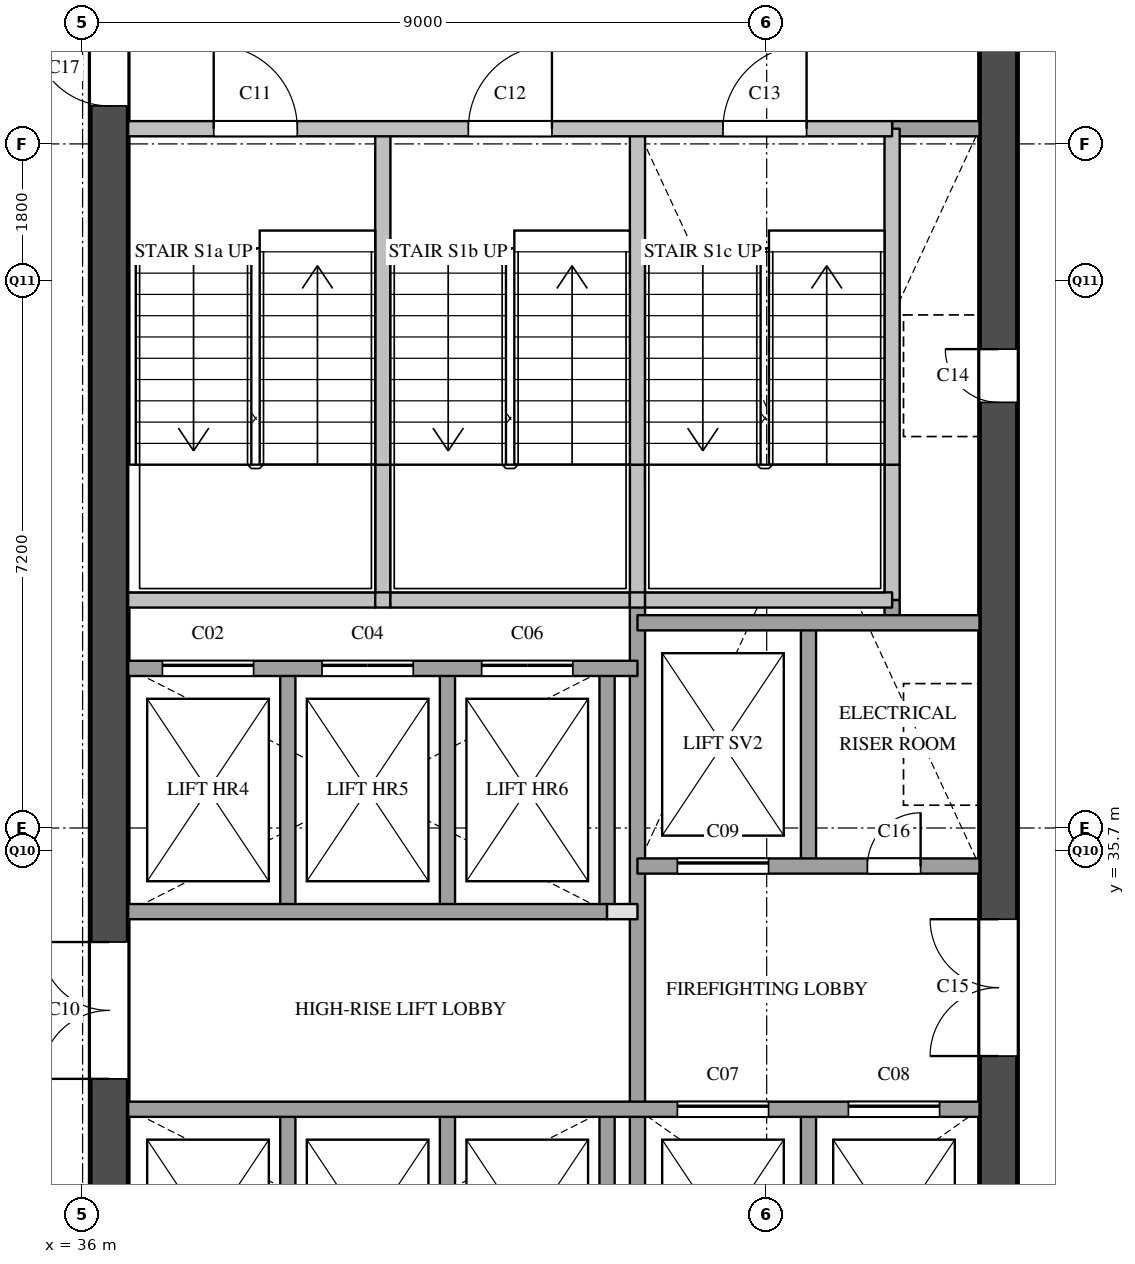
"""IFC4 building model, lengths in metres.
Left out: names, types, materials, properties, quantities, classifications, styles, units other than length and angle.
Written with IfcOpenShell. Run it as: python <this file> out.ifc"""

import sys

from ifc_helpers import new_model, si_unit, direction, frame, frame_2d, origin, place, context, subcontext, project, spatial, rectangle, extrude, element, fill, save


model = new_model("IFC4")
c1 = context("Model", 3, precision=1e-05, world=origin(), true_north=direction((0.0, 1.0)))
c2 = subcontext(c1, "Body", "Model", "MODEL_VIEW")
j1 = project(units=[si_unit("LENGTHUNIT", "METRE"), si_unit("PLANEANGLEUNIT", "RADIAN")], contexts=[c1])
p1 = place(None, origin())
s1 = spatial("IfcSite", under=j1, at=p1, CompositionType="ELEMENT")
p2 = place(p1, origin())
s2 = spatial("IfcBuilding", under=s1, at=p2, CompositionType="ELEMENT")
p3 = place(p2, frame((0.0, 0.0, 166.1)))
s3 = spatial("IfcBuildingStorey", under=s2, at=p3, CompositionType="ELEMENT", Elevation=166.1)
p4 = place(p3, frame((36.35, 29.1, 0.0), z_axis=(0.0, 0.0, 1.0), x_axis=(0.0, 1.0, 0.0)))
e1 = element("IfcWall", 1, at=p4, inside=s3, PredefinedType="SHEAR", context=c2, shape_type="SweptSolid", body=[
    extrude(rectangle(XDim=20.3, YDim=0.5, at=frame_2d((10.15, 0.0))), origin(), (0.0, 0.0, 1.0), 3.6),
])
p5 = place(p4, frame((3.6, 0.0, 0.0)))
e2 = element("IfcOpeningElement", 2, at=p5, cuts=e1, PredefinedType="OPENING", context=c2, shape_type="SweptSolid", body=[
    extrude(rectangle(XDim=1.8, YDim=2.1, at=frame_2d((0.9, 1.05))), frame((0.0, 0.26, 0.0), z_axis=(0.0, -1.0, 0.0), x_axis=(1.0, 0.0, 0.0)), (0.0, 0.0, 1.0), 0.52),
])
p6 = place(p4, frame((16.4, 0.0, 0.0)))
e3 = element("IfcOpeningElement", 3, at=p6, cuts=e1, PredefinedType="OPENING", context=c2, shape_type="SweptSolid", body=[
    extrude(rectangle(XDim=1.0, YDim=2.1, at=frame_2d((0.5, 1.05))), frame((0.0, 0.26, 0.0), z_axis=(0.0, -1.0, 0.0), x_axis=(1.0, 0.0, 0.0)), (0.0, 0.0, 1.0), 0.52),
])
p7 = place(p3, frame((48.05, 29.1, 0.0), z_axis=(0.0, 0.0, 1.0), x_axis=(0.0, 1.0, 0.0)))
e4 = element("IfcWall", 4, at=p7, inside=s3, PredefinedType="SHEAR", context=c2, shape_type="SweptSolid", body=[
    extrude(rectangle(XDim=20.3, YDim=0.5, at=frame_2d((10.15, 0.0))), origin(), (0.0, 0.0, 1.0), 3.6),
])
p8 = place(p7, frame((12.5, 0.0, 0.0)))
e5 = element("IfcOpeningElement", 5, at=p8, cuts=e4, PredefinedType="OPENING", context=c2, shape_type="SweptSolid", body=[
    extrude(rectangle(XDim=0.7, YDim=2.1, at=frame_2d((0.35, 1.05))), frame((0.0, 0.26, 0.0), z_axis=(0.0, -1.0, 0.0), x_axis=(1.0, 0.0, 0.0)), (0.0, 0.0, 1.0), 0.52),
])
p9 = place(p7, frame((3.9, 0.0, 0.0)))
e6 = element("IfcOpeningElement", 6, at=p9, cuts=e4, PredefinedType="OPENING", context=c2, shape_type="SweptSolid", body=[
    extrude(rectangle(XDim=1.8, YDim=2.1, at=frame_2d((0.9, 1.05))), frame((0.0, 0.26, 0.0), z_axis=(0.0, -1.0, 0.0), x_axis=(1.0, 0.0, 0.0)), (0.0, 0.0, 1.0), 0.52),
])
p10 = place(p3, frame((38.7, 29.1, 0.0), z_axis=(0.0, 0.0, 1.0), x_axis=(0.0, 1.0, 0.0)))
e7 = element("IfcWall", 7, at=p10, inside=s3, PredefinedType="SOLIDWALL", context=c2, shape_type="SweptSolid", body=[
    extrude(rectangle(XDim=3.2, YDim=0.2, at=frame_2d((1.6, 0.0))), origin(), (0.0, 0.0, 1.0), 3.6),
])
p11 = place(p3, frame((38.7, 34.9, 0.0), z_axis=(0.0, 0.0, 1.0), x_axis=(0.0, 1.0, 0.0)))
e8 = element("IfcWall", 8, at=p11, inside=s3, PredefinedType="SOLIDWALL", context=c2, shape_type="SweptSolid", body=[
    extrude(rectangle(XDim=3.2, YDim=0.2, at=frame_2d((1.6, 0.0))), origin(), (0.0, 0.0, 1.0), 3.6),
])
p12 = place(p3, frame((39.95, 39.0, 0.0), z_axis=(0.0, 0.0, 1.0), x_axis=(0.0, 1.0, 0.0)))
e9 = element("IfcWall", 9, at=p12, inside=s3, PredefinedType="SOLIDWALL", context=c2, shape_type="SweptSolid", body=[
    extrude(rectangle(XDim=1.78, YDim=0.2, at=frame_2d((0.89, 0.0))), origin(), (0.0, 0.0, 1.0), 3.6),
])
p13 = place(p3, frame((39.95, 40.78, 0.0), z_axis=(0.0, 0.0, 1.0), x_axis=(0.0, 1.0, 0.0)))
e10 = element("IfcWall", 10, at=p13, inside=s3, PredefinedType="SOLIDWALL", context=c2, shape_type="SweptSolid", body=[
    extrude(rectangle(XDim=4.42, YDim=0.2, at=frame_2d((2.21, 0.0))), origin(), (0.0, 0.0, 1.0), 3.6),
])
p14 = place(p3, frame((40.8, 29.1, 0.0), z_axis=(0.0, 0.0, 1.0), x_axis=(0.0, 1.0, 0.0)))
e11 = element("IfcWall", 11, at=p14, inside=s3, PredefinedType="SOLIDWALL", context=c2, shape_type="SweptSolid", body=[
    extrude(rectangle(XDim=3.2, YDim=0.2, at=frame_2d((1.6, 0.0))), origin(), (0.0, 0.0, 1.0), 3.6),
])
p15 = place(p3, frame((40.8, 34.9, 0.0), z_axis=(0.0, 0.0, 1.0), x_axis=(0.0, 1.0, 0.0)))
e12 = element("IfcWall", 12, at=p15, inside=s3, PredefinedType="SOLIDWALL", context=c2, shape_type="SweptSolid", body=[
    extrude(rectangle(XDim=3.2, YDim=0.2, at=frame_2d((1.6, 0.0))), origin(), (0.0, 0.0, 1.0), 3.6),
])
p16 = place(p3, frame((42.9, 29.1, 0.0), z_axis=(0.0, 0.0, 1.0), x_axis=(0.0, 1.0, 0.0)))
e13 = element("IfcWall", 13, at=p16, inside=s3, PredefinedType="SOLIDWALL", context=c2, shape_type="SweptSolid", body=[
    extrude(rectangle(XDim=3.2, YDim=0.2, at=frame_2d((1.6, 0.0))), origin(), (0.0, 0.0, 1.0), 3.6),
])
p17 = place(p3, frame((42.9, 34.9, 0.0), z_axis=(0.0, 0.0, 1.0), x_axis=(0.0, 1.0, 0.0)))
e14 = element("IfcWall", 14, at=p17, inside=s3, PredefinedType="SOLIDWALL", context=c2, shape_type="SweptSolid", body=[
    extrude(rectangle(XDim=3.2, YDim=0.2, at=frame_2d((1.6, 0.0))), origin(), (0.0, 0.0, 1.0), 3.6),
])
p18 = place(p3, frame((43.3, 29.1, 0.0), z_axis=(0.0, 0.0, 1.0), x_axis=(0.0, 1.0, 0.0)))
e15 = element("IfcWall", 15, at=p18, inside=s3, PredefinedType="SOLIDWALL", context=c2, shape_type="SweptSolid", body=[
    extrude(rectangle(XDim=9.9, YDim=0.2, at=frame_2d((4.95, 0.0))), origin(), (0.0, 0.0, 1.0), 3.6),
])
p19 = place(p3, frame((43.3, 39.0, 0.0), z_axis=(0.0, 0.0, 1.0), x_axis=(0.0, 1.0, 0.0)))
e16 = element("IfcWall", 16, at=p19, inside=s3, PredefinedType="SOLIDWALL", context=c2, shape_type="SweptSolid", body=[
    extrude(rectangle(XDim=1.78, YDim=0.2, at=frame_2d((0.89, 0.0))), origin(), (0.0, 0.0, 1.0), 3.6),
])
p20 = place(p3, frame((43.3, 40.78, 0.0), z_axis=(0.0, 0.0, 1.0), x_axis=(0.0, 1.0, 0.0)))
e17 = element("IfcWall", 17, at=p20, inside=s3, PredefinedType="SOLIDWALL", context=c2, shape_type="SweptSolid", body=[
    extrude(rectangle(XDim=4.42, YDim=0.2, at=frame_2d((2.21, 0.0))), origin(), (0.0, 0.0, 1.0), 3.6),
])
for number, where, z_axis, x_axis in (
    (18, (45.55, 29.1, 0.0), (0.0, 0.0, 1.0), (0.0, 1.0, 0.0)),
    (19, (45.55, 35.5, 0.0), (0.0, 0.0, 1.0), (0.0, 1.0, 0.0)),
):
    element("IfcWall", number, at=place(p3, frame(where, z_axis=z_axis, x_axis=x_axis)), inside=s3, PredefinedType="SOLIDWALL", context=c2, shape_type="SweptSolid", body=[
        extrude(rectangle(XDim=3.2, YDim=0.2, at=frame_2d((1.6, 0.0))), origin(), (0.0, 0.0, 1.0), 3.6),
    ])
p21 = place(p3, frame((46.65, 38.7, 0.0), z_axis=(0.0, 0.0, 1.0), x_axis=(0.0, 1.0, 0.0)))
e20 = element("IfcWall", 20, at=p21, inside=s3, PredefinedType="SOLIDWALL", context=c2, shape_type="SweptSolid", body=[
    extrude(rectangle(XDim=0.3, YDim=0.2, at=frame_2d((0.15, 0.0))), origin(), (0.0, 0.0, 1.0), 3.6),
])
p22 = place(p3, frame((46.65, 39.0, 0.0), z_axis=(0.0, 0.0, 1.0), x_axis=(0.0, 1.0, 0.0)))
e21 = element("IfcWall", 21, at=p22, inside=s3, PredefinedType="SOLIDWALL", context=c2, shape_type="SweptSolid", body=[
    extrude(rectangle(XDim=1.78, YDim=0.2, at=frame_2d((0.89, 0.0))), origin(), (0.0, 0.0, 1.0), 3.6),
])
p23 = place(p3, frame((46.65, 40.78, 0.0), z_axis=(0.0, 0.0, 1.0), x_axis=(0.0, 1.0, 0.0)))
e22 = element("IfcWall", 22, at=p23, inside=s3, PredefinedType="SOLIDWALL", context=c2, shape_type="SweptSolid", body=[
    extrude(rectangle(XDim=4.42, YDim=0.2, at=frame_2d((2.21, 0.0))), origin(), (0.0, 0.0, 1.0), 3.6),
])
p24 = place(p3, frame((36.6, 32.3, 0.0), z_axis=(0.0, 0.0, 1.0), x_axis=(1.0, 0.0, 0.0)))
e23 = element("IfcWall", 23, at=p24, inside=s3, PredefinedType="SOLIDWALL", context=c2, shape_type="SweptSolid", body=[
    extrude(rectangle(XDim=11.2, YDim=0.2, at=frame_2d((5.6, 0.0))), origin(), (0.0, 0.0, 1.0), 3.6),
])
p25 = place(p24, frame((7.225, 0.0, 0.0)))
e24 = element("IfcOpeningElement", 24, at=p25, cuts=e23, PredefinedType="OPENING", context=c2, shape_type="SweptSolid", body=[
    extrude(rectangle(XDim=1.2, YDim=2.1, at=frame_2d((0.6, 1.05))), frame((0.0, 0.11, 0.0), z_axis=(0.0, -1.0, 0.0), x_axis=(1.0, 0.0, 0.0)), (0.0, 0.0, 1.0), 0.22),
])
p26 = place(p24, frame((9.475, 0.0, 0.0)))
e25 = element("IfcOpeningElement", 25, at=p26, cuts=e23, PredefinedType="OPENING", context=c2, shape_type="SweptSolid", body=[
    extrude(rectangle(XDim=1.2, YDim=2.1, at=frame_2d((0.6, 1.05))), frame((0.0, 0.11, 0.0), z_axis=(0.0, -1.0, 0.0), x_axis=(1.0, 0.0, 0.0)), (0.0, 0.0, 1.0), 0.22),
])
p27 = place(p3, frame((42.9, 34.9, 0.0), z_axis=(0.0, 0.0, 1.0), x_axis=(1.0, 0.0, 0.0)))
e26 = element("IfcWall", 26, at=p27, inside=s3, PredefinedType="PARTITIONING", context=c2, shape_type="SweptSolid", body=[
    extrude(rectangle(XDim=0.4, YDim=0.2, at=frame_2d((0.2, 0.0))), origin(), (0.0, 0.0, 1.0), 3.6),
])
p28 = place(p3, frame((36.6, 34.9, 0.0), z_axis=(0.0, 0.0, 1.0), x_axis=(1.0, 0.0, 0.0)))
e27 = element("IfcWall", 27, at=p28, inside=s3, PredefinedType="SOLIDWALL", context=c2, shape_type="SweptSolid", body=[
    extrude(rectangle(XDim=6.3, YDim=0.2, at=frame_2d((3.15, 0.0))), origin(), (0.0, 0.0, 1.0), 3.6),
])
p29 = place(p3, frame((43.3, 35.5, 0.0), z_axis=(0.0, 0.0, 1.0), x_axis=(1.0, 0.0, 0.0)))
e28 = element("IfcWall", 28, at=p29, inside=s3, PredefinedType="SOLIDWALL", context=c2, shape_type="SweptSolid", body=[
    extrude(rectangle(XDim=4.5, YDim=0.2, at=frame_2d((2.25, 0.0))), origin(), (0.0, 0.0, 1.0), 3.6),
])
p30 = place(p29, frame((0.525, 0.0, 0.0)))
e29 = element("IfcOpeningElement", 29, at=p30, cuts=e28, PredefinedType="OPENING", context=c2, shape_type="SweptSolid", body=[
    extrude(rectangle(XDim=1.2, YDim=2.1, at=frame_2d((0.6, 1.05))), frame((0.0, 0.11, 0.0), z_axis=(0.0, -1.0, 0.0), x_axis=(1.0, 0.0, 0.0)), (0.0, 0.0, 1.0), 0.22),
])
p31 = place(p29, frame((3.025, 0.0, 0.0)))
e30 = element("IfcOpeningElement", 30, at=p31, cuts=e28, PredefinedType="OPENING", context=c2, shape_type="SweptSolid", body=[
    extrude(rectangle(XDim=0.7, YDim=2.1, at=frame_2d((0.35, 1.05))), frame((0.0, 0.11, 0.0), z_axis=(0.0, -1.0, 0.0), x_axis=(1.0, 0.0, 0.0)), (0.0, 0.0, 1.0), 0.22),
])
p32 = place(p3, frame((36.6, 38.1, 0.0), z_axis=(0.0, 0.0, 1.0), x_axis=(1.0, 0.0, 0.0)))
e31 = element("IfcWall", 31, at=p32, inside=s3, PredefinedType="SOLIDWALL", context=c2, shape_type="SweptSolid", body=[
    extrude(rectangle(XDim=6.7, YDim=0.2, at=frame_2d((3.35, 0.0))), origin(), (0.0, 0.0, 1.0), 3.6),
])
p33 = place(p32, frame((0.45, 0.0, 0.0)))
e32 = element("IfcOpeningElement", 32, at=p33, cuts=e31, PredefinedType="OPENING", context=c2, shape_type="SweptSolid", body=[
    extrude(rectangle(XDim=1.2, YDim=2.1, at=frame_2d((0.6, 1.05))), frame((0.0, 0.11, 0.0), z_axis=(0.0, -1.0, 0.0), x_axis=(1.0, 0.0, 0.0)), (0.0, 0.0, 1.0), 0.22),
])
p34 = place(p32, frame((2.55, 0.0, 0.0)))
e33 = element("IfcOpeningElement", 33, at=p34, cuts=e31, PredefinedType="OPENING", context=c2, shape_type="SweptSolid", body=[
    extrude(rectangle(XDim=1.2, YDim=2.1, at=frame_2d((0.6, 1.05))), frame((0.0, 0.11, 0.0), z_axis=(0.0, -1.0, 0.0), x_axis=(1.0, 0.0, 0.0)), (0.0, 0.0, 1.0), 0.22),
])
p35 = place(p32, frame((4.65, 0.0, 0.0)))
e34 = element("IfcOpeningElement", 34, at=p35, cuts=e31, PredefinedType="OPENING", context=c2, shape_type="SweptSolid", body=[
    extrude(rectangle(XDim=1.2, YDim=2.1, at=frame_2d((0.6, 1.05))), frame((0.0, 0.11, 0.0), z_axis=(0.0, -1.0, 0.0), x_axis=(1.0, 0.0, 0.0)), (0.0, 0.0, 1.0), 0.22),
])
p36 = place(p3, frame((43.3, 38.7, 0.0), z_axis=(0.0, 0.0, 1.0), x_axis=(1.0, 0.0, 0.0)))
e35 = element("IfcWall", 35, at=p36, inside=s3, PredefinedType="SOLIDWALL", context=c2, shape_type="SweptSolid", body=[
    extrude(rectangle(XDim=4.5, YDim=0.2, at=frame_2d((2.25, 0.0))), origin(), (0.0, 0.0, 1.0), 3.6),
])
p37 = place(p3, frame((36.6, 39.0, 0.0), z_axis=(0.0, 0.0, 1.0), x_axis=(1.0, 0.0, 0.0)))
e36 = element("IfcWall", 36, at=p37, inside=s3, PredefinedType="SOLIDWALL", context=c2, shape_type="SweptSolid", body=[
    extrude(rectangle(XDim=3.25, YDim=0.2, at=frame_2d((1.625, 0.0))), origin(), (0.0, 0.0, 1.0), 3.6),
])
p38 = place(p3, frame((39.85, 39.0, 0.0), z_axis=(0.0, 0.0, 1.0), x_axis=(1.0, 0.0, 0.0)))
e37 = element("IfcWall", 37, at=p38, inside=s3, PredefinedType="SOLIDWALL", context=c2, shape_type="SweptSolid", body=[
    extrude(rectangle(XDim=0.2, YDim=0.2, at=frame_2d((0.1, 0.0))), origin(), (0.0, 0.0, 1.0), 3.6),
])
p39 = place(p3, frame((40.05, 39.0, 0.0), z_axis=(0.0, 0.0, 1.0), x_axis=(1.0, 0.0, 0.0)))
e38 = element("IfcWall", 38, at=p39, inside=s3, PredefinedType="SOLIDWALL", context=c2, shape_type="SweptSolid", body=[
    extrude(rectangle(XDim=3.15, YDim=0.2, at=frame_2d((1.575, 0.0))), origin(), (0.0, 0.0, 1.0), 3.6),
])
p40 = place(p3, frame((43.2, 39.0, 0.0), z_axis=(0.0, 0.0, 1.0), x_axis=(1.0, 0.0, 0.0)))
e39 = element("IfcWall", 39, at=p40, inside=s3, PredefinedType="SOLIDWALL", context=c2, shape_type="SweptSolid", body=[
    extrude(rectangle(XDim=0.2, YDim=0.2, at=frame_2d((0.1, 0.0))), origin(), (0.0, 0.0, 1.0), 3.6),
])
p41 = place(p3, frame((43.4, 39.0, 0.0), z_axis=(0.0, 0.0, 1.0), x_axis=(1.0, 0.0, 0.0)))
e40 = element("IfcWall", 40, at=p41, inside=s3, PredefinedType="SOLIDWALL", context=c2, shape_type="SweptSolid", body=[
    extrude(rectangle(XDim=3.25, YDim=0.2, at=frame_2d((1.625, 0.0))), origin(), (0.0, 0.0, 1.0), 3.6),
])
p42 = place(p3, frame((46.65, 45.2, 0.0), z_axis=(0.0, 0.0, 1.0), x_axis=(1.0, 0.0, 0.0)))
e41 = element("IfcWall", 41, at=p42, inside=s3, PredefinedType="SOLIDWALL", context=c2, shape_type="SweptSolid", body=[
    extrude(rectangle(XDim=1.15, YDim=0.2, at=frame_2d((0.575, 0.0))), origin(), (0.0, 0.0, 1.0), 3.6),
])
p43 = place(p3, frame((36.6, 45.2, 0.0), z_axis=(0.0, 0.0, 1.0), x_axis=(1.0, 0.0, 0.0)))
e42 = element("IfcWall", 42, at=p43, inside=s3, PredefinedType="SOLIDWALL", context=c2, shape_type="SweptSolid", body=[
    extrude(rectangle(XDim=10.05, YDim=0.2, at=frame_2d((5.025, 0.0))), origin(), (0.0, 0.0, 1.0), 3.6),
])
p44 = place(p43, frame((1.125, 0.0, 0.0)))
e43 = element("IfcOpeningElement", 43, at=p44, cuts=e42, PredefinedType="OPENING", context=c2, shape_type="SweptSolid", body=[
    extrude(rectangle(XDim=1.1, YDim=2.1, at=frame_2d((0.55, 1.05))), frame((0.0, 0.11, 0.0), z_axis=(0.0, -1.0, 0.0), x_axis=(1.0, 0.0, 0.0)), (0.0, 0.0, 1.0), 0.22),
])
p45 = place(p43, frame((4.475, 0.0, 0.0)))
e44 = element("IfcOpeningElement", 44, at=p45, cuts=e42, PredefinedType="OPENING", context=c2, shape_type="SweptSolid", body=[
    extrude(rectangle(XDim=1.1, YDim=2.1, at=frame_2d((0.55, 1.05))), frame((0.0, 0.11, 0.0), z_axis=(0.0, -1.0, 0.0), x_axis=(1.0, 0.0, 0.0)), (0.0, 0.0, 1.0), 0.22),
])
p46 = place(p43, frame((7.825, 0.0, 0.0)))
e45 = element("IfcOpeningElement", 45, at=p46, cuts=e42, PredefinedType="OPENING", context=c2, shape_type="SweptSolid", body=[
    extrude(rectangle(XDim=1.1, YDim=2.1, at=frame_2d((0.55, 1.05))), frame((0.0, 0.11, 0.0), z_axis=(0.0, -1.0, 0.0), x_axis=(1.0, 0.0, 0.0)), (0.0, 0.0, 1.0), 0.22),
])
p47 = place(p33, origin())
e46 = element("IfcDoor", 46, at=p47, inside=s3, OperationType="SLIDING_TO_LEFT", PredefinedType="DOOR", context=c2, shape_type="SweptSolid", body=[
    extrude(rectangle(XDim=1.2, YDim=2.1, at=frame_2d((0.6, 1.05))), frame((0.0, 0.025, 0.0), z_axis=(0.0, -1.0, 0.0), x_axis=(1.0, 0.0, 0.0)), (0.0, 0.0, 1.0), 0.05),
])
fill(e32, e46)
p48 = place(p34, origin())
e47 = element("IfcDoor", 47, at=p48, inside=s3, OperationType="SLIDING_TO_LEFT", PredefinedType="DOOR", context=c2, shape_type="SweptSolid", body=[
    extrude(rectangle(XDim=1.2, YDim=2.1, at=frame_2d((0.6, 1.05))), frame((0.0, 0.025, 0.0), z_axis=(0.0, -1.0, 0.0), x_axis=(1.0, 0.0, 0.0)), (0.0, 0.0, 1.0), 0.05),
])
fill(e33, e47)
p49 = place(p35, origin())
e48 = element("IfcDoor", 48, at=p49, inside=s3, OperationType="SLIDING_TO_LEFT", PredefinedType="DOOR", context=c2, shape_type="SweptSolid", body=[
    extrude(rectangle(XDim=1.2, YDim=2.1, at=frame_2d((0.6, 1.05))), frame((0.0, 0.025, 0.0), z_axis=(0.0, -1.0, 0.0), x_axis=(1.0, 0.0, 0.0)), (0.0, 0.0, 1.0), 0.05),
])
fill(e34, e48)
p50 = place(p25, origin())
e49 = element("IfcDoor", 49, at=p50, inside=s3, OperationType="SLIDING_TO_LEFT", PredefinedType="DOOR", context=c2, shape_type="SweptSolid", body=[
    extrude(rectangle(XDim=1.2, YDim=2.1, at=frame_2d((0.6, 1.05))), frame((0.0, 0.025, 0.0), z_axis=(0.0, -1.0, 0.0), x_axis=(1.0, 0.0, 0.0)), (0.0, 0.0, 1.0), 0.05),
])
fill(e24, e49)
p51 = place(p26, origin())
e50 = element("IfcDoor", 50, at=p51, inside=s3, OperationType="SLIDING_TO_LEFT", PredefinedType="DOOR", context=c2, shape_type="SweptSolid", body=[
    extrude(rectangle(XDim=1.2, YDim=2.1, at=frame_2d((0.6, 1.05))), frame((0.0, 0.025, 0.0), z_axis=(0.0, -1.0, 0.0), x_axis=(1.0, 0.0, 0.0)), (0.0, 0.0, 1.0), 0.05),
])
fill(e25, e50)
p52 = place(p30, origin())
e51 = element("IfcDoor", 51, at=p52, inside=s3, OperationType="SLIDING_TO_LEFT", PredefinedType="DOOR", context=c2, shape_type="SweptSolid", body=[
    extrude(rectangle(XDim=1.2, YDim=2.1, at=frame_2d((0.6, 1.05))), frame((0.0, 0.025, 0.0), z_axis=(0.0, -1.0, 0.0), x_axis=(1.0, 0.0, 0.0)), (0.0, 0.0, 1.0), 0.05),
])
fill(e29, e51)
p53 = place(p5, origin())
e52 = element("IfcDoor", 52, at=p53, inside=s3, OperationType="DOUBLE_DOOR_SINGLE_SWING", PredefinedType="DOOR", context=c2, shape_type="SweptSolid", body=[
    extrude(rectangle(XDim=1.8, YDim=2.1, at=frame_2d((0.9, 1.05))), frame((0.0, 0.025, 0.0), z_axis=(0.0, -1.0, 0.0), x_axis=(1.0, 0.0, 0.0)), (0.0, 0.0, 1.0), 0.05),
])
fill(e2, e52)
p54 = place(p44, origin())
e53 = element("IfcDoor", 53, at=p54, inside=s3, OperationType="SINGLE_SWING_LEFT", PredefinedType="DOOR", context=c2, shape_type="SweptSolid", body=[
    extrude(rectangle(XDim=1.1, YDim=2.1, at=frame_2d((0.55, 1.05))), frame((0.0, 0.025, 0.0), z_axis=(0.0, -1.0, 0.0), x_axis=(1.0, 0.0, 0.0)), (0.0, 0.0, 1.0), 0.05),
])
fill(e43, e53)
p55 = place(p45, origin())
e54 = element("IfcDoor", 54, at=p55, inside=s3, OperationType="SINGLE_SWING_RIGHT", PredefinedType="DOOR", context=c2, shape_type="SweptSolid", body=[
    extrude(rectangle(XDim=1.1, YDim=2.1, at=frame_2d((0.55, 1.05))), frame((0.0, 0.025, 0.0), z_axis=(0.0, -1.0, 0.0), x_axis=(1.0, 0.0, 0.0)), (0.0, 0.0, 1.0), 0.05),
])
fill(e44, e54)
p56 = place(p46, origin())
e55 = element("IfcDoor", 55, at=p56, inside=s3, OperationType="SINGLE_SWING_RIGHT", PredefinedType="DOOR", context=c2, shape_type="SweptSolid", body=[
    extrude(rectangle(XDim=1.1, YDim=2.1, at=frame_2d((0.55, 1.05))), frame((0.0, 0.025, 0.0), z_axis=(0.0, -1.0, 0.0), x_axis=(1.0, 0.0, 0.0)), (0.0, 0.0, 1.0), 0.05),
])
fill(e45, e55)
p57 = place(p8, origin())
e56 = element("IfcDoor", 56, at=p57, inside=s3, OperationType="SINGLE_SWING_RIGHT", PredefinedType="DOOR", context=c2, shape_type="SweptSolid", body=[
    extrude(rectangle(XDim=0.7, YDim=2.1, at=frame_2d((0.35, 1.05))), frame((0.0, 0.025, 0.0), z_axis=(0.0, -1.0, 0.0), x_axis=(1.0, 0.0, 0.0)), (0.0, 0.0, 1.0), 0.05),
])
fill(e5, e56)
p58 = place(p9, origin())
e57 = element("IfcDoor", 57, at=p58, inside=s3, OperationType="DOUBLE_DOOR_SINGLE_SWING", PredefinedType="DOOR", context=c2, shape_type="SweptSolid", body=[
    extrude(rectangle(XDim=1.8, YDim=2.1, at=frame_2d((0.9, 1.05))), frame((0.0, 0.025, 0.0), z_axis=(0.0, -1.0, 0.0), x_axis=(1.0, 0.0, 0.0)), (0.0, 0.0, 1.0), 0.05),
])
fill(e6, e57)
p59 = place(p31, origin())
e58 = element("IfcDoor", 58, at=p59, inside=s3, OperationType="SINGLE_SWING_RIGHT", PredefinedType="DOOR", context=c2, shape_type="SweptSolid", body=[
    extrude(rectangle(XDim=0.7, YDim=2.1, at=frame_2d((0.35, 1.05))), frame((0.0, 0.025, 0.0), z_axis=(0.0, -1.0, 0.0), x_axis=(1.0, 0.0, 0.0)), (0.0, 0.0, 1.0), 0.05),
])
fill(e30, e58)
p60 = place(p6, origin())
e59 = element("IfcDoor", 59, at=p60, inside=s3, OperationType="SINGLE_SWING_RIGHT", PredefinedType="DOOR", context=c2, shape_type="SweptSolid", body=[
    extrude(rectangle(XDim=1.0, YDim=2.1, at=frame_2d((0.5, 1.05))), frame((0.0, 0.025, 0.0), z_axis=(0.0, -1.0, 0.0), x_axis=(1.0, 0.0, 0.0)), (0.0, 0.0, 1.0), 0.05),
])
fill(e3, e59)
save(model, sys.argv[1])
